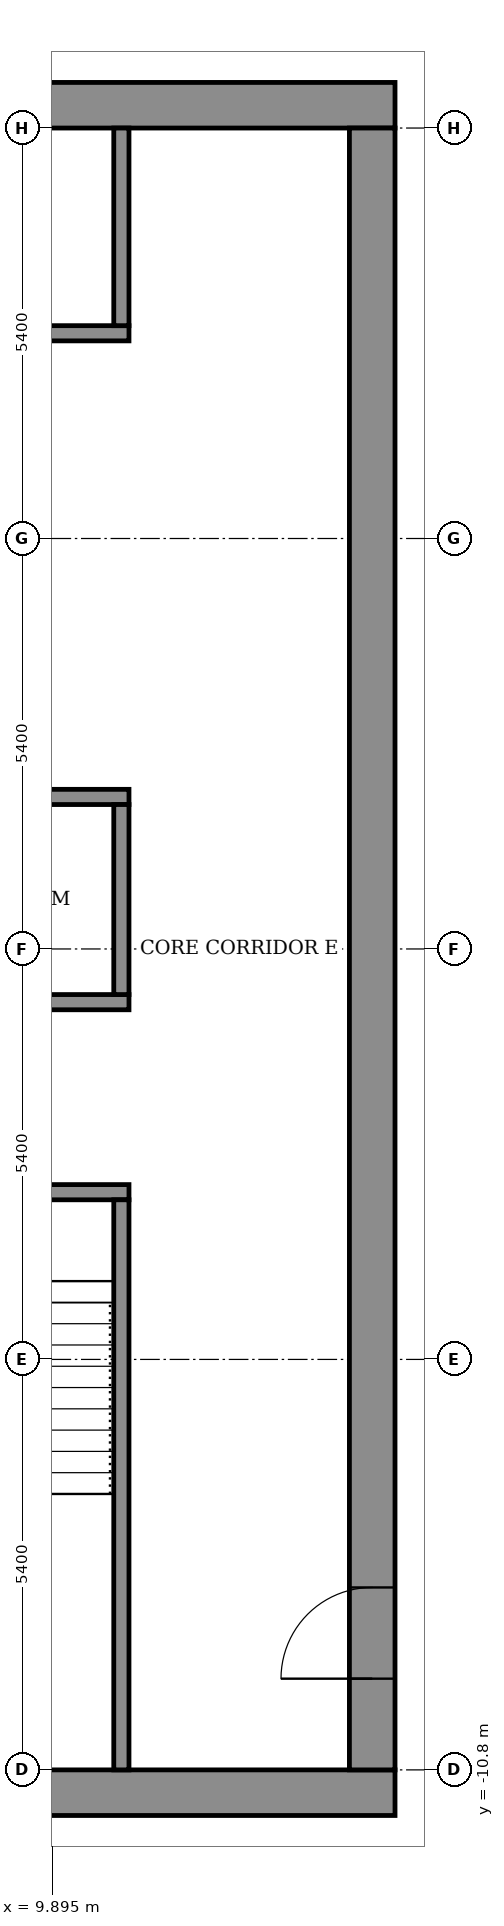
"""IFC4 building model, lengths in metres.
Left out: names, types, materials, properties, quantities, classifications, styles, units other than length and angle.
Written with IfcOpenShell. Run it as: python <this file> out.ifc"""

import sys

from ifc_helpers import new_model, si_unit, direction, frame, frame_2d, origin, place, context, subcontext, project, spatial, rectangle, extrude, element, fill, save


model = new_model("IFC4")
c1 = context("Model", 3, precision=1e-05, world=origin(), true_north=direction((0.0, 1.0)))
c2 = subcontext(c1, "Body", "Model", "MODEL_VIEW")
j1 = project(units=[si_unit("LENGTHUNIT", "METRE"), si_unit("PLANEANGLEUNIT", "RADIAN")], contexts=[c1])
p1 = place(None, origin())
s1 = spatial("IfcSite", under=j1, at=p1, CompositionType="ELEMENT")
p2 = place(p1, origin())
s2 = spatial("IfcBuilding", under=s1, at=p2, CompositionType="ELEMENT")
p3 = place(p2, frame((0.0, 0.0, 350.7)))
s3 = spatial("IfcBuildingStorey", under=s2, at=p3, CompositionType="ELEMENT", Elevation=350.7)
for number, where, z_axis, x_axis in (
    (1, (-14.4, -11.1, 0.0), (0.0, 0.0, 1.0), (1.0, 0.0, 0.0)),
    (2, (-14.4, 11.1, 0.0), (0.0, 0.0, 1.0), (1.0, 0.0, 0.0)),
):
    element("IfcWall", number, at=place(p3, frame(where, z_axis=z_axis, x_axis=x_axis)), inside=s3, PredefinedType="SHEAR", context=c2, shape_type="SweptSolid", body=[
        extrude(rectangle(XDim=28.8, YDim=0.6, at=frame_2d((14.4, 0.0))), origin(), (0.0, 0.0, 1.0), 3.6),
    ])
p4 = place(p3, frame((14.1, -10.8, 0.0), z_axis=(0.0, 0.0, 1.0), x_axis=(0.0, 1.0, 0.0)))
e3 = element("IfcWall", 3, at=p4, inside=s3, PredefinedType="SHEAR", context=c2, shape_type="SweptSolid", body=[
    extrude(rectangle(XDim=21.6, YDim=0.6, at=frame_2d((10.8, 0.0))), origin(), (0.0, 0.0, 1.0), 3.6),
])
p5 = place(p4, frame((1.2, 0.0, 0.0)))
e4 = element("IfcOpeningElement", 4, at=p5, cuts=e3, PredefinedType="OPENING", context=c2, shape_type="SweptSolid", body=[
    extrude(rectangle(XDim=1.2, YDim=2.1, at=frame_2d((0.6, 1.05))), frame((0.0, 0.31, 0.0), z_axis=(0.0, -1.0, 0.0), x_axis=(1.0, 0.0, 0.0)), (0.0, 0.0, 1.0), 0.62),
])
p6 = place(p3, frame((-10.9, -3.2, 0.0), z_axis=(0.0, 0.0, 1.0), x_axis=(1.0, 0.0, 0.0)))
e5 = element("IfcWall", 5, at=p6, inside=s3, PredefinedType="SHEAR", context=c2, shape_type="SweptSolid", body=[
    extrude(rectangle(XDim=21.8, YDim=0.2, at=frame_2d((10.9, 0.0))), origin(), (0.0, 0.0, 1.0), 3.05),
])
p7 = place(p6, frame((1.075, 0.0, 0.0)))
e6 = element("IfcOpeningElement", 6, at=p7, cuts=e5, PredefinedType="OPENING", context=c2, shape_type="SweptSolid", body=[
    extrude(rectangle(XDim=1.1, YDim=2.1, at=frame_2d((0.55, 1.05))), frame((0.0, 0.11, 0.0), z_axis=(0.0, -1.0, 0.0), x_axis=(1.0, 0.0, 0.0)), (0.0, 0.0, 1.0), 0.22),
])
p8 = place(p6, frame((10.325, 0.0, 0.0)))
e7 = element("IfcOpeningElement", 7, at=p8, cuts=e5, PredefinedType="OPENING", context=c2, shape_type="SweptSolid", body=[
    extrude(rectangle(XDim=1.1, YDim=2.1, at=frame_2d((0.55, 1.05))), frame((0.0, 0.11, 0.0), z_axis=(0.0, -1.0, 0.0), x_axis=(1.0, 0.0, 0.0)), (0.0, 0.0, 1.0), 0.22),
])
p9 = place(p6, frame((19.625, 0.0, 0.0)))
e8 = element("IfcOpeningElement", 8, at=p9, cuts=e5, PredefinedType="OPENING", context=c2, shape_type="SweptSolid", body=[
    extrude(rectangle(XDim=1.1, YDim=2.1, at=frame_2d((0.55, 1.05))), frame((0.0, 0.11, 0.0), z_axis=(0.0, -1.0, 0.0), x_axis=(1.0, 0.0, 0.0)), (0.0, 0.0, 1.0), 0.22),
])
p10 = place(p6, frame((5.7, 0.0, 0.0)))
e9 = element("IfcOpeningElement", 9, at=p10, cuts=e5, PredefinedType="OPENING", context=c2, shape_type="SweptSolid", body=[
    extrude(rectangle(XDim=1.1, YDim=2.1, at=frame_2d((0.55, 1.05))), frame((0.0, 0.11, 0.0), z_axis=(0.0, -1.0, 0.0), x_axis=(1.0, 0.0, 0.0)), (0.0, 0.0, 1.0), 0.22),
])
p11 = place(p6, frame((14.975, 0.0, 0.0)))
e10 = element("IfcOpeningElement", 10, at=p11, cuts=e5, PredefinedType="OPENING", context=c2, shape_type="SweptSolid", body=[
    extrude(rectangle(XDim=1.1, YDim=2.1, at=frame_2d((0.55, 1.05))), frame((0.0, 0.11, 0.0), z_axis=(0.0, -1.0, 0.0), x_axis=(1.0, 0.0, 0.0)), (0.0, 0.0, 1.0), 0.22),
])
p12 = place(p3, frame((-10.9, -0.7, 0.0), z_axis=(0.0, 0.0, 1.0), x_axis=(1.0, 0.0, 0.0)))
e11 = element("IfcWall", 11, at=p12, inside=s3, PredefinedType="SHEAR", context=c2, shape_type="SweptSolid", body=[
    extrude(rectangle(XDim=21.8, YDim=0.2, at=frame_2d((10.9, 0.0))), origin(), (0.0, 0.0, 1.0), 3.05),
])
p13 = place(p3, frame((-10.9, 2.0, 0.0), z_axis=(0.0, 0.0, 1.0), x_axis=(1.0, 0.0, 0.0)))
e12 = element("IfcWall", 12, at=p13, inside=s3, PredefinedType="SHEAR", context=c2, shape_type="SweptSolid", body=[
    extrude(rectangle(XDim=21.8, YDim=0.2, at=frame_2d((10.9, 0.0))), origin(), (0.0, 0.0, 1.0), 3.05),
])
p14 = place(p13, frame((4.95, 0.0, 0.0)))
e13 = element("IfcOpeningElement", 13, at=p14, cuts=e12, PredefinedType="OPENING", context=c2, shape_type="SweptSolid", body=[
    extrude(rectangle(XDim=1.1, YDim=2.1, at=frame_2d((0.55, 1.05))), frame((0.0, 0.11, 0.0), z_axis=(0.0, -1.0, 0.0), x_axis=(1.0, 0.0, 0.0)), (0.0, 0.0, 1.0), 0.22),
])
p15 = place(p13, frame((7.65, 0.0, 0.0)))
e14 = element("IfcOpeningElement", 14, at=p15, cuts=e12, PredefinedType="OPENING", context=c2, shape_type="SweptSolid", body=[
    extrude(rectangle(XDim=1.1, YDim=2.1, at=frame_2d((0.55, 1.05))), frame((0.0, 0.11, 0.0), z_axis=(0.0, -1.0, 0.0), x_axis=(1.0, 0.0, 0.0)), (0.0, 0.0, 1.0), 0.22),
])
p16 = place(p13, frame((10.35, 0.0, 0.0)))
e15 = element("IfcOpeningElement", 15, at=p16, cuts=e12, PredefinedType="OPENING", context=c2, shape_type="SweptSolid", body=[
    extrude(rectangle(XDim=1.1, YDim=2.1, at=frame_2d((0.55, 1.05))), frame((0.0, 0.11, 0.0), z_axis=(0.0, -1.0, 0.0), x_axis=(1.0, 0.0, 0.0)), (0.0, 0.0, 1.0), 0.22),
])
p17 = place(p13, frame((1.675, 0.0, 0.0)))
e16 = element("IfcOpeningElement", 16, at=p17, cuts=e12, PredefinedType="OPENING", context=c2, shape_type="SweptSolid", body=[
    extrude(rectangle(XDim=0.9, YDim=2.1, at=frame_2d((0.45, 1.05))), frame((0.0, 0.11, 0.0), z_axis=(0.0, -1.0, 0.0), x_axis=(1.0, 0.0, 0.0)), (0.0, 0.0, 1.0), 0.22),
])
p18 = place(p13, frame((14.5, 0.0, 0.0)))
e17 = element("IfcOpeningElement", 17, at=p18, cuts=e12, PredefinedType="OPENING", context=c2, shape_type="SweptSolid", body=[
    extrude(rectangle(XDim=0.9, YDim=2.1, at=frame_2d((0.45, 1.05))), frame((0.0, 0.11, 0.0), z_axis=(0.0, -1.0, 0.0), x_axis=(1.0, 0.0, 0.0)), (0.0, 0.0, 1.0), 0.22),
])
p19 = place(p13, frame((19.225, 0.0, 0.0)))
e18 = element("IfcOpeningElement", 18, at=p19, cuts=e12, PredefinedType="OPENING", context=c2, shape_type="SweptSolid", body=[
    extrude(rectangle(XDim=0.9, YDim=2.1, at=frame_2d((0.45, 1.05))), frame((0.0, 0.11, 0.0), z_axis=(0.0, -1.0, 0.0), x_axis=(1.0, 0.0, 0.0)), (0.0, 0.0, 1.0), 0.22),
])
p20 = place(p3, frame((-10.9, 8.1, 0.0), z_axis=(0.0, 0.0, 1.0), x_axis=(1.0, 0.0, 0.0)))
e19 = element("IfcWall", 19, at=p20, inside=s3, PredefinedType="SHEAR", context=c2, shape_type="SweptSolid", body=[
    extrude(rectangle(XDim=21.8, YDim=0.2, at=frame_2d((10.9, 0.0))), origin(), (0.0, 0.0, 1.0), 3.05),
])
p21 = place(p20, frame((4.95, 0.0, 0.0)))
e20 = element("IfcOpeningElement", 20, at=p21, cuts=e19, PredefinedType="OPENING", context=c2, shape_type="SweptSolid", body=[
    extrude(rectangle(XDim=1.1, YDim=2.1, at=frame_2d((0.55, 1.05))), frame((0.0, 0.11, 0.0), z_axis=(0.0, -1.0, 0.0), x_axis=(1.0, 0.0, 0.0)), (0.0, 0.0, 1.0), 0.22),
])
p22 = place(p20, frame((7.65, 0.0, 0.0)))
e21 = element("IfcOpeningElement", 21, at=p22, cuts=e19, PredefinedType="OPENING", context=c2, shape_type="SweptSolid", body=[
    extrude(rectangle(XDim=1.1, YDim=2.1, at=frame_2d((0.55, 1.05))), frame((0.0, 0.11, 0.0), z_axis=(0.0, -1.0, 0.0), x_axis=(1.0, 0.0, 0.0)), (0.0, 0.0, 1.0), 0.22),
])
p23 = place(p20, frame((10.35, 0.0, 0.0)))
e22 = element("IfcOpeningElement", 22, at=p23, cuts=e19, PredefinedType="OPENING", context=c2, shape_type="SweptSolid", body=[
    extrude(rectangle(XDim=1.1, YDim=2.1, at=frame_2d((0.55, 1.05))), frame((0.0, 0.11, 0.0), z_axis=(0.0, -1.0, 0.0), x_axis=(1.0, 0.0, 0.0)), (0.0, 0.0, 1.0), 0.22),
])
p24 = place(p20, frame((1.675, 0.0, 0.0)))
e23 = element("IfcOpeningElement", 23, at=p24, cuts=e19, PredefinedType="OPENING", context=c2, shape_type="SweptSolid", body=[
    extrude(rectangle(XDim=0.9, YDim=2.1, at=frame_2d((0.45, 1.05))), frame((0.0, 0.11, 0.0), z_axis=(0.0, -1.0, 0.0), x_axis=(1.0, 0.0, 0.0)), (0.0, 0.0, 1.0), 0.22),
])
p25 = place(p20, frame((14.5, 0.0, 0.0)))
e24 = element("IfcOpeningElement", 24, at=p25, cuts=e19, PredefinedType="OPENING", context=c2, shape_type="SweptSolid", body=[
    extrude(rectangle(XDim=0.9, YDim=2.1, at=frame_2d((0.45, 1.05))), frame((0.0, 0.11, 0.0), z_axis=(0.0, -1.0, 0.0), x_axis=(1.0, 0.0, 0.0)), (0.0, 0.0, 1.0), 0.22),
])
p26 = place(p20, frame((19.225, 0.0, 0.0)))
e25 = element("IfcOpeningElement", 25, at=p26, cuts=e19, PredefinedType="OPENING", context=c2, shape_type="SweptSolid", body=[
    extrude(rectangle(XDim=0.9, YDim=2.1, at=frame_2d((0.45, 1.05))), frame((0.0, 0.11, 0.0), z_axis=(0.0, -1.0, 0.0), x_axis=(1.0, 0.0, 0.0)), (0.0, 0.0, 1.0), 0.22),
])
p27 = place(p3, frame((10.8, -10.8, 0.0), z_axis=(0.0, 0.0, 1.0), x_axis=(0.0, 1.0, 0.0)))
e26 = element("IfcWall", 26, at=p27, inside=s3, PredefinedType="SHEAR", context=c2, shape_type="SweptSolid", body=[
    extrude(rectangle(XDim=7.5, YDim=0.2, at=frame_2d((3.75, 0.0))), origin(), (0.0, 0.0, 1.0), 3.05),
])
p28 = place(p3, frame((10.8, -0.6, 0.0), z_axis=(0.0, 0.0, 1.0), x_axis=(0.0, 1.0, 0.0)))
e27 = element("IfcWall", 27, at=p28, inside=s3, PredefinedType="STANDARD", context=c2, shape_type="SweptSolid", body=[
    extrude(rectangle(XDim=2.5, YDim=0.2, at=frame_2d((1.25, 0.0))), origin(), (0.0, 0.0, 1.0), 3.05),
])
p29 = place(p3, frame((10.8, 8.2, 0.0), z_axis=(0.0, 0.0, 1.0), x_axis=(0.0, 1.0, 0.0)))
e28 = element("IfcWall", 28, at=p29, inside=s3, PredefinedType="STANDARD", context=c2, shape_type="SweptSolid", body=[
    extrude(rectangle(XDim=2.6, YDim=0.2, at=frame_2d((1.3, 0.0))), origin(), (0.0, 0.0, 1.0), 3.05),
])
p30 = place(p5, origin())
e29 = element("IfcDoor", 29, at=p30, inside=s3, OperationType="DOUBLE_DOOR_SINGLE_SWING", PredefinedType="DOOR", context=c2, shape_type="SweptSolid", body=[
    extrude(rectangle(XDim=1.2, YDim=2.1, at=frame_2d((0.6, 1.05))), frame((0.0, 0.025, 0.0), z_axis=(0.0, -1.0, 0.0), x_axis=(1.0, 0.0, 0.0)), (0.0, 0.0, 1.0), 0.05),
])
fill(e4, e29)
save(model, sys.argv[1])
